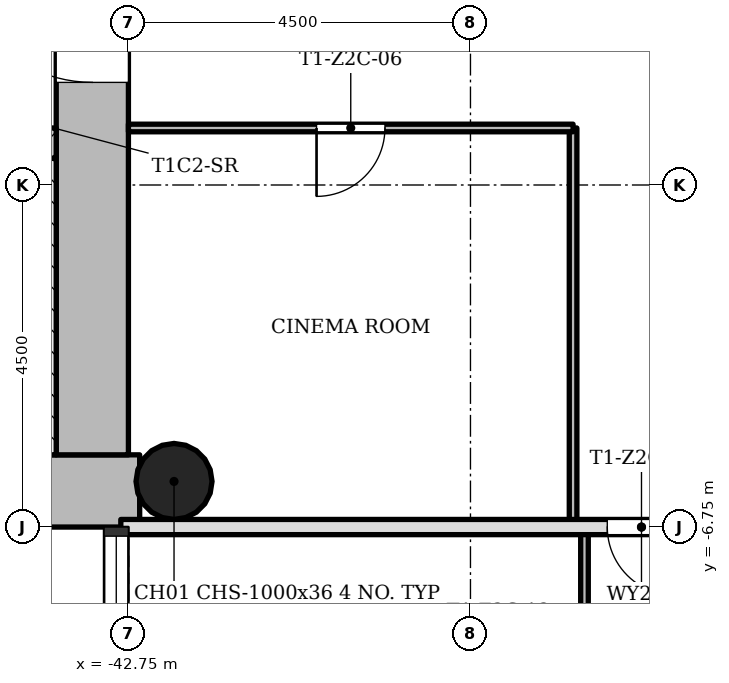
"""IFC4 building model, lengths in metres.
Left out: names, types, materials, properties, quantities, classifications, styles, units other than length and angle.
Written with IfcOpenShell. Run it as: python <this file> out.ifc"""

import sys

from ifc_helpers import new_model, si_unit, direction, frame, frame_2d, origin, origin_2d, place, context, subcontext, project, spatial, rectangle, hollow_circle, extrude, element, fill, save


model = new_model("IFC4")
c1 = context("Model", 3, precision=1e-05, world=origin(), true_north=direction((0.0, 1.0)))
c2 = subcontext(c1, "Body", "Model", "MODEL_VIEW")
j1 = project(units=[si_unit("LENGTHUNIT", "METRE"), si_unit("PLANEANGLEUNIT", "RADIAN")], contexts=[c1])
p1 = place(None, origin())
s1 = spatial("IfcSite", under=j1, at=p1, CompositionType="ELEMENT")
p2 = place(p1, origin())
s2 = spatial("IfcBuilding", under=s1, at=p2, CompositionType="ELEMENT")
p3 = place(p2, frame((0.0, 0.0, 93.6)))
s3 = spatial("IfcBuildingStorey", under=s2, at=p3, CompositionType="ELEMENT", Elevation=93.6)
p4 = place(p3, frame((-51.298, -6.275, 0.0), z_axis=(0.0, 0.0, 1.0), x_axis=(1.0, 0.0, 0.0)))
e1 = element("IfcWall", 1, at=p4, inside=s3, PredefinedType="SHEAR", context=c2, shape_type="SweptSolid", body=[
    extrude(rectangle(XDim=8.696, YDim=0.95, at=frame_2d((4.348, 0.0))), origin(), (0.0, 0.0, 1.0), 3.4),
])
p5 = place(p3, frame((-43.225, -5.8, 0.0), z_axis=(0.0, 0.0, 1.0), x_axis=(0.0, 1.0, 0.0)))
e2 = element("IfcWall", 2, at=p5, inside=s3, PredefinedType="SHEAR", context=c2, shape_type="SweptSolid", body=[
    extrude(rectangle(XDim=12.55, YDim=0.95, at=frame_2d((6.275, 0.0))), origin(), (0.0, 0.0, 1.0), 3.4),
])
p6 = place(p5, frame((4.9, 0.0, 0.0)))
e3 = element("IfcOpeningElement", 3, at=p6, cuts=e2, PredefinedType="OPENING", context=c2, shape_type="SweptSolid", body=[
    extrude(rectangle(XDim=1.8, YDim=2.1, at=frame_2d((0.9, 1.05))), frame((0.0, 0.485, 0.0), z_axis=(0.0, -1.0, 0.0), x_axis=(1.0, 0.0, 0.0)), (0.0, 0.0, 1.0), 0.97),
])
p7 = place(p3, frame((-50.8, -1.7, 0.0), z_axis=(0.0, 0.0, 1.0), x_axis=(1.0, 0.0, 0.0)))
e4 = element("IfcWall", 4, at=p7, inside=s3, PredefinedType="SHEAR", context=c2, shape_type="SweptSolid", body=[
    extrude(rectangle(XDim=7.1, YDim=0.4, at=frame_2d((3.55, 0.0))), origin(), (0.0, 0.0, 1.0), 3.4),
])
p8 = place(p7, frame((5.5, 0.0, 0.0)))
e5 = element("IfcOpeningElement", 5, at=p8, cuts=e4, PredefinedType="OPENING", context=c2, shape_type="SweptSolid", body=[
    extrude(rectangle(XDim=0.9, YDim=2.1, at=frame_2d((0.45, 1.05))), frame((0.0, 0.21, 0.0), z_axis=(0.0, -1.0, 0.0), x_axis=(1.0, 0.0, 0.0)), (0.0, 0.0, 1.0), 0.42),
])
p9 = place(p3, frame((-42.15, -6.15, 0.0), z_axis=(0.0, 0.0, 1.0), x_axis=(1.0, 0.0, 0.0)))
e6 = element("IfcColumn", 6, at=p9, inside=s3, PredefinedType="COLUMN", context=c2, shape_type="SweptSolid", body=[
    extrude(hollow_circle(Radius=0.5, WallThickness=0.036, at=origin_2d()), origin(), (0.0, 0.0, 1.0), 3.4),
])
p10 = place(p3, frame((-36.9, -6.75, 0.0), z_axis=(0.0, 0.0, 1.0), x_axis=(0.0, 1.0, 0.0)))
e7 = element("IfcWall", 7, at=p10, inside=s3, PredefinedType="PARTITIONING", context=c2, shape_type="SweptSolid", body=[
    extrude(rectangle(XDim=5.25, YDim=0.1, at=frame_2d((2.625, 0.0))), origin(), (0.0, 0.0, 1.0), 3.0),
])
p11 = place(p3, frame((-36.75, -14.55, 0.0), z_axis=(0.0, 0.0, 1.0), x_axis=(0.0, 1.0, 0.0)))
e8 = element("IfcWall", 8, at=p11, inside=s3, PredefinedType="PARTITIONING", context=c2, shape_type="SweptSolid", body=[
    extrude(rectangle(XDim=7.8, YDim=0.1, at=frame_2d((3.9, 0.0))), origin(), (0.0, 0.0, 1.0), 3.0),
])
p12 = place(p11, frame((5.1, 0.0, 0.0)))
e9 = element("IfcOpeningElement", 9, at=p12, cuts=e8, PredefinedType="OPENING", context=c2, shape_type="SweptSolid", body=[
    extrude(rectangle(XDim=0.9, YDim=2.1, at=frame_2d((0.45, 1.05))), frame((0.0, 0.06, 0.0), z_axis=(0.0, -1.0, 0.0), x_axis=(1.0, 0.0, 0.0)), (0.0, 0.0, 1.0), 0.12),
])
p13 = place(p11, frame((1.95, 0.0, 0.0)))
e10 = element("IfcOpeningElement", 10, at=p13, cuts=e8, PredefinedType="OPENING", context=c2, shape_type="SweptSolid", body=[
    extrude(rectangle(XDim=0.9, YDim=2.1, at=frame_2d((0.45, 1.05))), frame((0.0, 0.06, 0.0), z_axis=(0.0, -1.0, 0.0), x_axis=(1.0, 0.0, 0.0)), (0.0, 0.0, 1.0), 0.12),
])
p14 = place(p11, frame((0.3, 0.0, 0.0)))
e11 = element("IfcOpeningElement", 11, at=p14, cuts=e8, PredefinedType="OPENING", context=c2, shape_type="SweptSolid", body=[
    extrude(rectangle(XDim=0.9, YDim=2.1, at=frame_2d((0.45, 1.05))), frame((0.0, 0.06, 0.0), z_axis=(0.0, -1.0, 0.0), x_axis=(1.0, 0.0, 0.0)), (0.0, 0.0, 1.0), 0.12),
])
p15 = place(p3, frame((-42.85, -6.75, 0.0), z_axis=(0.0, 0.0, 1.0), x_axis=(1.0, 0.0, 0.0)))
e12 = element("IfcWall", 12, at=p15, inside=s3, PredefinedType="SOLIDWALL", context=c2, shape_type="SweptSolid", body=[
    extrude(rectangle(XDim=13.7, YDim=0.2, at=frame_2d((6.85, 0.0))), origin(), (0.0, 0.0, 1.0), 3.0),
])
p16 = place(p15, frame((6.4, 0.0, 0.0)))
e13 = element("IfcOpeningElement", 13, at=p16, cuts=e12, PredefinedType="OPENING", context=c2, shape_type="SweptSolid", body=[
    extrude(rectangle(XDim=0.9, YDim=2.1, at=frame_2d((0.45, 1.05))), frame((0.0, 0.11, 0.0), z_axis=(0.0, -1.0, 0.0), x_axis=(1.0, 0.0, 0.0)), (0.0, 0.0, 1.0), 0.22),
])
p17 = place(p3, frame((-42.75, -1.5, 0.0), z_axis=(0.0, 0.0, 1.0), x_axis=(1.0, 0.0, 0.0)))
e14 = element("IfcWall", 14, at=p17, inside=s3, PredefinedType="PARTITIONING", context=c2, shape_type="SweptSolid", body=[
    extrude(rectangle(XDim=5.85, YDim=0.1, at=frame_2d((2.925, 0.0))), origin(), (0.0, 0.0, 1.0), 3.0),
])
p18 = place(p17, frame((2.475, 0.0, 0.0)))
e15 = element("IfcOpeningElement", 15, at=p18, cuts=e14, PredefinedType="OPENING", context=c2, shape_type="SweptSolid", body=[
    extrude(rectangle(XDim=0.9, YDim=2.1, at=frame_2d((0.45, 1.05))), frame((0.0, 0.06, 0.0), z_axis=(0.0, -1.0, 0.0), x_axis=(1.0, 0.0, 0.0)), (0.0, 0.0, 1.0), 0.12),
])
p19 = place(p3, frame((-43.825, -1.9, 0.0), z_axis=(0.0, 0.0, 1.0), x_axis=(0.0, -1.0, 0.0)))
e16 = element("IfcWall", 16, at=p19, inside=s3, PredefinedType="SHEAR", context=c2, shape_type="SweptSolid", body=[
    extrude(rectangle(XDim=3.9, YDim=0.25, at=frame_2d((1.95, 0.0))), origin(), (0.0, 0.0, 1.0), 3.4),
])
p20 = place(p18, origin())
e17 = element("IfcDoor", 17, at=p20, inside=s3, OperationType="SINGLE_SWING_LEFT", PredefinedType="DOOR", context=c2, shape_type="SweptSolid", body=[
    extrude(rectangle(XDim=0.9, YDim=2.1, at=frame_2d((0.45, 1.05))), frame((0.0, 0.025, 0.0), z_axis=(0.0, -1.0, 0.0), x_axis=(1.0, 0.0, 0.0)), (0.0, 0.0, 1.0), 0.05),
])
fill(e15, e17)
p21 = place(p16, origin())
e18 = element("IfcDoor", 18, at=p21, inside=s3, OperationType="SINGLE_SWING_RIGHT", PredefinedType="DOOR", context=c2, shape_type="SweptSolid", body=[
    extrude(rectangle(XDim=0.9, YDim=2.1, at=frame_2d((0.45, 1.05))), frame((0.0, 0.025, 0.0), z_axis=(0.0, -1.0, 0.0), x_axis=(1.0, 0.0, 0.0)), (0.0, 0.0, 1.0), 0.05),
])
fill(e13, e18)
p22 = place(p6, origin())
e19 = element("IfcDoor", 19, at=p22, inside=s3, OperationType="SINGLE_SWING_LEFT", PredefinedType="DOOR", context=c2, shape_type="SweptSolid", body=[
    extrude(rectangle(XDim=1.8, YDim=2.1, at=frame_2d((0.9, 1.05))), frame((0.0, 0.025, 0.0), z_axis=(0.0, -1.0, 0.0), x_axis=(1.0, 0.0, 0.0)), (0.0, 0.0, 1.0), 0.05),
])
fill(e3, e19)
save(model, sys.argv[1])
